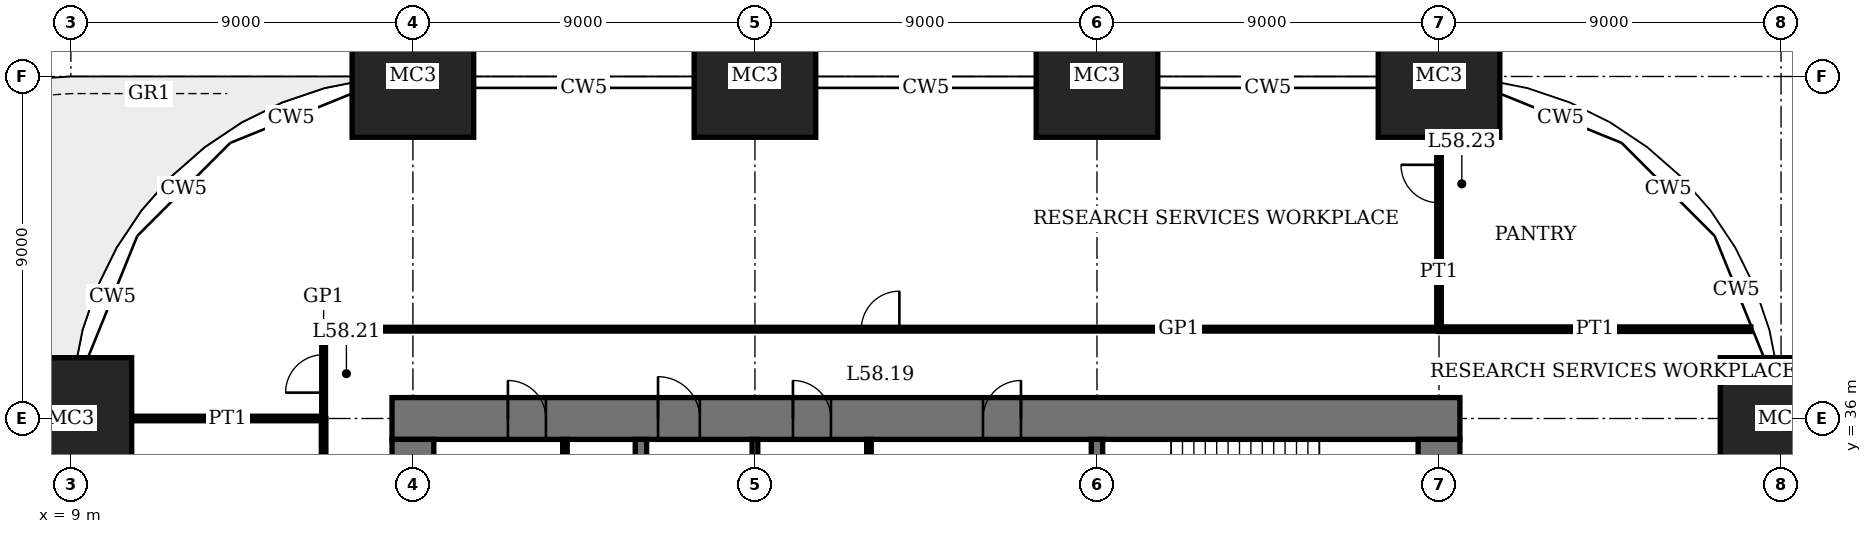
"""IFC4 building model, lengths in metres.
Left out: names, types, materials, properties, quantities, classifications, styles, units other than length and angle.
Written with IfcOpenShell. Run it as: python <this file> out.ifc"""

import sys

from ifc_helpers import new_model, si_unit, direction, frame, frame_2d, origin, origin_2d, place, context, subcontext, project, spatial, rectangle, extrude, element, fill, save


model = new_model("IFC4")
c1 = context("Model", 3, precision=1e-05, world=origin(), true_north=direction((0.0, 1.0)))
c2 = subcontext(c1, "Body", "Model", "MODEL_VIEW")
j1 = project(units=[si_unit("LENGTHUNIT", "METRE"), si_unit("PLANEANGLEUNIT", "RADIAN")], contexts=[c1])
p1 = place(None, origin())
s1 = spatial("IfcSite", under=j1, at=p1, CompositionType="ELEMENT")
p2 = place(p1, origin())
s2 = spatial("IfcBuilding", under=s1, at=p2, CompositionType="ELEMENT")
p3 = place(p2, frame((0.0, 0.0, 239.4)))
s3 = spatial("IfcBuildingStorey", under=s2, at=p3, CompositionType="ELEMENT", Elevation=239.4)
for number, where, z_axis, x_axis in (
    (1, (9.0, 36.0, 0.0), (0.0, 0.0, 1.0), (1.0, 0.0, 0.0)),
    (2, (18.0, 45.0, 0.0), (0.0, 0.0, 1.0), (1.0, 0.0, 0.0)),
    (3, (27.0, 45.0, 0.0), (0.0, 0.0, 1.0), (1.0, 0.0, 0.0)),
    (4, (36.0, 45.0, 0.0), (0.0, 0.0, 1.0), (1.0, 0.0, 0.0)),
    (5, (45.0, 45.0, 0.0), (0.0, 0.0, 1.0), (1.0, 0.0, 0.0)),
    (6, (54.0, 36.0, 0.0), (0.0, 0.0, 1.0), (1.0, 0.0, 0.0)),
):
    element("IfcColumn", number, at=place(p3, frame(where, z_axis=z_axis, x_axis=x_axis)), inside=s3, PredefinedType="COLUMN", context=c2, shape_type="SweptSolid", body=[
        extrude(rectangle(XDim=3.2, YDim=3.2, at=origin_2d()), origin(), (0.0, 0.0, 1.0), 4.0),
    ])
p4 = place(p3, frame((45.55, 36.0, 0.0), z_axis=(0.0, 0.0, 1.0), x_axis=(-1.0, 0.0, 0.0)))
e7 = element("IfcWall", 7, at=p4, inside=s3, PredefinedType="SHEAR", context=c2, shape_type="SweptSolid", body=[
    extrude(rectangle(XDim=28.1, YDim=1.1, at=frame_2d((14.05, 0.0))), origin(), (0.0, 0.0, 1.0), 4.0),
])
p5 = place(p4, frame((11.55, 0.0, 0.0)))
e8 = element("IfcOpeningElement", 8, at=p5, cuts=e7, PredefinedType="OPENING", context=c2, shape_type="SweptSolid", body=[
    extrude(rectangle(XDim=1.0, YDim=2.4, at=frame_2d((0.5, 1.2))), frame((0.0, 0.56, 0.0), z_axis=(0.0, -1.0, 0.0), x_axis=(1.0, 0.0, 0.0)), (0.0, 0.0, 1.0), 1.12),
])
p6 = place(p4, frame((16.55, 0.0, 0.0)))
e9 = element("IfcOpeningElement", 9, at=p6, cuts=e7, PredefinedType="OPENING", context=c2, shape_type="SweptSolid", body=[
    extrude(rectangle(XDim=1.0, YDim=2.4, at=frame_2d((0.5, 1.2))), frame((0.0, 0.56, 0.0), z_axis=(0.0, -1.0, 0.0), x_axis=(1.0, 0.0, 0.0)), (0.0, 0.0, 1.0), 1.12),
])
p7 = place(p4, frame((20.0, 0.0, 0.0)))
e10 = element("IfcOpeningElement", 10, at=p7, cuts=e7, PredefinedType="OPENING", context=c2, shape_type="SweptSolid", body=[
    extrude(rectangle(XDim=1.1, YDim=2.4, at=frame_2d((0.55, 1.2))), frame((0.0, 0.56, 0.0), z_axis=(0.0, -1.0, 0.0), x_axis=(1.0, 0.0, 0.0)), (0.0, 0.0, 1.0), 1.12),
])
p8 = place(p4, frame((24.05, 0.0, 0.0)))
e11 = element("IfcOpeningElement", 11, at=p8, cuts=e7, PredefinedType="OPENING", context=c2, shape_type="SweptSolid", body=[
    extrude(rectangle(XDim=1.0, YDim=2.4, at=frame_2d((0.5, 1.2))), frame((0.0, 0.56, 0.0), z_axis=(0.0, -1.0, 0.0), x_axis=(1.0, 0.0, 0.0)), (0.0, 0.0, 1.0), 1.12),
])
p9 = place(p3, frame((18.0, 35.45, 0.0), z_axis=(0.0, 0.0, 1.0), x_axis=(0.0, -1.0, 0.0)))
e12 = element("IfcWall", 12, at=p9, inside=s3, PredefinedType="SHEAR", context=c2, shape_type="SweptSolid", body=[
    extrude(rectangle(XDim=16.9, YDim=1.1, at=frame_2d((8.45, 0.0))), origin(), (0.0, 0.0, 1.0), 4.0),
])
p10 = place(p9, frame((8.9, 0.0, 0.0)))
e13 = element("IfcOpeningElement", 13, at=p10, cuts=e12, PredefinedType="OPENING", context=c2, shape_type="SweptSolid", body=[
    extrude(rectangle(XDim=1.8, YDim=2.4, at=frame_2d((0.9, 1.2))), frame((0.0, 0.56, 0.0), z_axis=(0.0, -1.0, 0.0), x_axis=(1.0, 0.0, 0.0)), (0.0, 0.0, 1.0), 1.12),
])
p11 = place(p3, frame((45.0, 18.55, 0.0), z_axis=(0.0, 0.0, 1.0), x_axis=(0.0, 1.0, 0.0)))
e14 = element("IfcWall", 14, at=p11, inside=s3, PredefinedType="SHEAR", context=c2, shape_type="SweptSolid", body=[
    extrude(rectangle(XDim=16.9, YDim=1.1, at=frame_2d((8.45, 0.0))), origin(), (0.0, 0.0, 1.0), 4.0),
])
p12 = place(p11, frame((8.9, 0.0, 0.0)))
e15 = element("IfcOpeningElement", 15, at=p12, cuts=e14, PredefinedType="OPENING", context=c2, shape_type="SweptSolid", body=[
    extrude(rectangle(XDim=1.8, YDim=2.4, at=frame_2d((0.9, 1.2))), frame((0.0, 0.56, 0.0), z_axis=(0.0, -1.0, 0.0), x_axis=(1.0, 0.0, 0.0)), (0.0, 0.0, 1.0), 1.12),
])
p13 = place(p3, frame((36.0, 32.4, 0.0), z_axis=(0.0, 0.0, 1.0), x_axis=(0.0, 1.0, 0.0)))
e16 = element("IfcWall", 16, at=p13, inside=s3, PredefinedType="SHEAR", context=c2, shape_type="SweptSolid", body=[
    extrude(rectangle(XDim=3.05, YDim=0.3, at=frame_2d((1.525, 0.0))), origin(), (0.0, 0.0, 1.0), 4.0),
])
p14 = place(p3, frame((24.0, 29.55, 0.0), z_axis=(0.0, 0.0, 1.0), x_axis=(0.0, 1.0, 0.0)))
e17 = element("IfcWall", 17, at=p14, inside=s3, PredefinedType="SHEAR", context=c2, shape_type="SweptSolid", body=[
    extrude(rectangle(XDim=5.9, YDim=0.3, at=frame_2d((2.95, 0.0))), origin(), (0.0, 0.0, 1.0), 4.0),
])
p15 = place(p3, frame((10.6, 36.0, 0.0), z_axis=(0.0, 0.0, 1.0), x_axis=(1.0, 0.0, 0.0)))
e18 = element("IfcWall", 18, at=p15, inside=s3, PredefinedType="PARTITIONING", context=c2, shape_type="SweptSolid", body=[
    extrude(rectangle(XDim=5.05, YDim=0.12, at=frame_2d((2.525, 0.0))), origin(), (0.0, 0.0, 1.0), 3.05),
])
p16 = place(p3, frame((45.0, 38.35, 0.0), z_axis=(0.0, 0.0, 1.0), x_axis=(1.0, 0.0, 0.0)))
e19 = element("IfcWall", 19, at=p16, inside=s3, PredefinedType="PARTITIONING", context=c2, shape_type="SweptSolid", body=[
    extrude(rectangle(XDim=8.206, YDim=0.12, at=frame_2d((4.103, 0.0))), origin(), (0.0, 0.0, 1.0), 3.75),
])
p17 = place(p3, frame((15.6, 38.35, 0.0), z_axis=(0.0, 0.0, 1.0), x_axis=(1.0, 0.0, 0.0)))
e20 = element("IfcWall", 20, at=p17, inside=s3, PredefinedType="PARTITIONING", context=c2, shape_type="SweptSolid", body=[
    extrude(rectangle(XDim=29.4, YDim=0.1, at=frame_2d((14.7, 0.0))), origin(), (0.0, 0.0, 1.0), 3.75),
])
p18 = place(p17, frame((14.2, 0.0, 0.0)))
e21 = element("IfcOpeningElement", 21, at=p18, cuts=e20, PredefinedType="OPENING", context=c2, shape_type="SweptSolid", body=[
    extrude(rectangle(XDim=1.0, YDim=2.4, at=frame_2d((0.5, 1.2))), frame((0.0, 0.06, 0.0), z_axis=(0.0, -1.0, 0.0), x_axis=(1.0, 0.0, 0.0)), (0.0, 0.0, 1.0), 0.12),
])
p19 = place(p3, frame((15.65, 27.0, 0.0), z_axis=(0.0, 0.0, 1.0), x_axis=(0.0, 1.0, 0.0)))
e22 = element("IfcWall", 22, at=p19, inside=s3, PredefinedType="PARTITIONING", context=c2, shape_type="SweptSolid", body=[
    extrude(rectangle(XDim=9.0, YDim=0.12, at=frame_2d((4.5, 0.0))), origin(), (0.0, 0.0, 1.0), 3.75),
])
p20 = place(p19, frame((3.6, 0.0, 0.0)))
e23 = element("IfcOpeningElement", 23, at=p20, cuts=e22, PredefinedType="OPENING", context=c2, shape_type="SweptSolid", body=[
    extrude(rectangle(XDim=1.8, YDim=2.4, at=frame_2d((0.9, 1.2))), frame((0.0, 0.07, 0.0), z_axis=(0.0, -1.0, 0.0), x_axis=(1.0, 0.0, 0.0)), (0.0, 0.0, 1.0), 0.14),
])
p21 = place(p3, frame((15.65, 36.01, 0.0), z_axis=(0.0, 0.0, 1.0), x_axis=(0.0, 1.0, 0.0)))
e24 = element("IfcWall", 24, at=p21, inside=s3, PredefinedType="PARTITIONING", context=c2, shape_type="SweptSolid", body=[
    extrude(rectangle(XDim=2.34, YDim=0.1, at=frame_2d((1.17, 0.0))), origin(), (0.0, 0.0, 1.0), 3.75),
])
p22 = place(p21, frame((0.67, 0.0, 0.0)))
e25 = element("IfcOpeningElement", 25, at=p22, cuts=e24, PredefinedType="OPENING", context=c2, shape_type="SweptSolid", body=[
    extrude(rectangle(XDim=1.0, YDim=2.4, at=frame_2d((0.5, 1.2))), frame((0.0, 0.06, 0.0), z_axis=(0.0, -1.0, 0.0), x_axis=(1.0, 0.0, 0.0)), (0.0, 0.0, 1.0), 0.12),
])
p23 = place(p3, frame((45.0, 38.35, 0.0), z_axis=(0.0, 0.0, 1.0), x_axis=(0.0, 1.0, 0.0)))
e26 = element("IfcWall", 26, at=p23, inside=s3, PredefinedType="PARTITIONING", context=c2, shape_type="SweptSolid", body=[
    extrude(rectangle(XDim=5.05, YDim=0.12, at=frame_2d((2.525, 0.0))), origin(), (0.0, 0.0, 1.0), 3.05),
])
p24 = place(p23, frame((3.325, 0.0, 0.0)))
e27 = element("IfcOpeningElement", 27, at=p24, cuts=e26, PredefinedType="OPENING", context=c2, shape_type="SweptSolid", body=[
    extrude(rectangle(XDim=1.0, YDim=2.4, at=frame_2d((0.5, 1.2))), frame((0.0, 0.07, 0.0), z_axis=(0.0, -1.0, 0.0), x_axis=(1.0, 0.0, 0.0)), (0.0, 0.0, 1.0), 0.14),
])
p25 = place(p3, frame((30.0, 32.55, 0.0), z_axis=(0.0, 0.0, 1.0), x_axis=(0.0, 1.0, 0.0)))
e28 = element("IfcWall", 28, at=p25, inside=s3, PredefinedType="PARTITIONING", context=c2, shape_type="SweptSolid", body=[
    extrude(rectangle(XDim=2.9, YDim=0.12, at=frame_2d((1.45, 0.0))), origin(), (0.0, 0.0, 1.0), 3.75),
])
p26 = place(p3, frame((27.0, 32.55, 0.0), z_axis=(0.0, 0.0, 1.0), x_axis=(0.0, 1.0, 0.0)))
e29 = element("IfcWall", 29, at=p26, inside=s3, PredefinedType="PARTITIONING", context=c2, shape_type="SweptSolid", body=[
    extrude(rectangle(XDim=2.9, YDim=0.15, at=frame_2d((1.45, 0.0))), origin(), (0.0, 0.0, 1.0), 3.75),
])
p27 = place(p3, frame((22.0, 32.55, 0.0), z_axis=(0.0, 0.0, 1.0), x_axis=(0.0, 1.0, 0.0)))
e30 = element("IfcWall", 30, at=p27, inside=s3, PredefinedType="PARTITIONING", context=c2, shape_type="SweptSolid", body=[
    extrude(rectangle(XDim=2.9, YDim=0.12, at=frame_2d((1.45, 0.0))), origin(), (0.0, 0.0, 1.0), 3.75),
])
p28 = place(p27, frame((0.95, 0.0, 0.0)))
e31 = element("IfcOpeningElement", 31, at=p28, cuts=e30, PredefinedType="OPENING", context=c2, shape_type="SweptSolid", body=[
    extrude(rectangle(XDim=1.0, YDim=2.4, at=frame_2d((0.5, 1.2))), frame((0.0, 0.07, 0.0), z_axis=(0.0, -1.0, 0.0), x_axis=(1.0, 0.0, 0.0)), (0.0, 0.0, 1.0), 0.14),
])
p29 = place(p5, origin())
e32 = element("IfcDoor", 32, at=p29, inside=s3, OperationType="SINGLE_SWING_LEFT", PredefinedType="DOOR", context=c2, shape_type="SweptSolid", body=[
    extrude(rectangle(XDim=1.0, YDim=2.4, at=frame_2d((0.5, 1.2))), frame((0.0, 0.025, 0.0), z_axis=(0.0, -1.0, 0.0), x_axis=(1.0, 0.0, 0.0)), (0.0, 0.0, 1.0), 0.05),
    extrude(rectangle(XDim=0.04, YDim=2.4, at=frame_2d((0.02, 1.2))), frame((0.0, 0.4, 0.0), z_axis=(0.0, -1.0, 0.0), x_axis=(1.0, 0.0, 0.0)), (0.0, 0.0, 1.0), 0.8),
    extrude(rectangle(XDim=0.04, YDim=2.4, at=frame_2d((0.98, 1.2))), frame((0.0, 0.4, 0.0), z_axis=(0.0, -1.0, 0.0), x_axis=(1.0, 0.0, 0.0)), (0.0, 0.0, 1.0), 0.8),
    extrude(rectangle(XDim=1.0, YDim=0.04, at=frame_2d((0.5, 2.38))), frame((0.0, 0.4, 0.0), z_axis=(0.0, -1.0, 0.0), x_axis=(1.0, 0.0, 0.0)), (0.0, 0.0, 1.0), 0.8),
])
fill(e8, e32)
p30 = place(p6, origin())
e33 = element("IfcDoor", 33, at=p30, inside=s3, OperationType="SINGLE_SWING_RIGHT", PredefinedType="DOOR", context=c2, shape_type="SweptSolid", body=[
    extrude(rectangle(XDim=1.0, YDim=2.4, at=frame_2d((0.5, 1.2))), frame((0.0, 0.025, 0.0), z_axis=(0.0, -1.0, 0.0), x_axis=(1.0, 0.0, 0.0)), (0.0, 0.0, 1.0), 0.05),
    extrude(rectangle(XDim=0.04, YDim=2.4, at=frame_2d((0.02, 1.2))), frame((0.0, 0.4, 0.0), z_axis=(0.0, -1.0, 0.0), x_axis=(1.0, 0.0, 0.0)), (0.0, 0.0, 1.0), 0.8),
    extrude(rectangle(XDim=0.04, YDim=2.4, at=frame_2d((0.98, 1.2))), frame((0.0, 0.4, 0.0), z_axis=(0.0, -1.0, 0.0), x_axis=(1.0, 0.0, 0.0)), (0.0, 0.0, 1.0), 0.8),
    extrude(rectangle(XDim=1.0, YDim=0.04, at=frame_2d((0.5, 2.38))), frame((0.0, 0.4, 0.0), z_axis=(0.0, -1.0, 0.0), x_axis=(1.0, 0.0, 0.0)), (0.0, 0.0, 1.0), 0.8),
])
fill(e9, e33)
p31 = place(p7, origin())
e34 = element("IfcDoor", 34, at=p31, inside=s3, OperationType="SINGLE_SWING_RIGHT", PredefinedType="DOOR", context=c2, shape_type="SweptSolid", body=[
    extrude(rectangle(XDim=1.1, YDim=2.4, at=frame_2d((0.55, 1.2))), frame((0.0, 0.025, 0.0), z_axis=(0.0, -1.0, 0.0), x_axis=(1.0, 0.0, 0.0)), (0.0, 0.0, 1.0), 0.05),
    extrude(rectangle(XDim=0.04, YDim=2.4, at=frame_2d((0.02, 1.2))), frame((0.0, 0.44, 0.0), z_axis=(0.0, -1.0, 0.0), x_axis=(1.0, 0.0, 0.0)), (0.0, 0.0, 1.0), 0.88),
    extrude(rectangle(XDim=0.04, YDim=2.4, at=frame_2d((1.08, 1.2))), frame((0.0, 0.44, 0.0), z_axis=(0.0, -1.0, 0.0), x_axis=(1.0, 0.0, 0.0)), (0.0, 0.0, 1.0), 0.88),
    extrude(rectangle(XDim=1.1, YDim=0.04, at=frame_2d((0.55, 2.38))), frame((0.0, 0.44, 0.0), z_axis=(0.0, -1.0, 0.0), x_axis=(1.0, 0.0, 0.0)), (0.0, 0.0, 1.0), 0.88),
])
fill(e10, e34)
p32 = place(p8, origin())
e35 = element("IfcDoor", 35, at=p32, inside=s3, OperationType="SINGLE_SWING_RIGHT", PredefinedType="DOOR", context=c2, shape_type="SweptSolid", body=[
    extrude(rectangle(XDim=1.0, YDim=2.4, at=frame_2d((0.5, 1.2))), frame((0.0, 0.025, 0.0), z_axis=(0.0, -1.0, 0.0), x_axis=(1.0, 0.0, 0.0)), (0.0, 0.0, 1.0), 0.05),
    extrude(rectangle(XDim=0.04, YDim=2.4, at=frame_2d((0.02, 1.2))), frame((0.0, 0.4, 0.0), z_axis=(0.0, -1.0, 0.0), x_axis=(1.0, 0.0, 0.0)), (0.0, 0.0, 1.0), 0.8),
    extrude(rectangle(XDim=0.04, YDim=2.4, at=frame_2d((0.98, 1.2))), frame((0.0, 0.4, 0.0), z_axis=(0.0, -1.0, 0.0), x_axis=(1.0, 0.0, 0.0)), (0.0, 0.0, 1.0), 0.8),
    extrude(rectangle(XDim=1.0, YDim=0.04, at=frame_2d((0.5, 2.38))), frame((0.0, 0.4, 0.0), z_axis=(0.0, -1.0, 0.0), x_axis=(1.0, 0.0, 0.0)), (0.0, 0.0, 1.0), 0.8),
])
fill(e11, e35)
p33 = place(p18, origin())
e36 = element("IfcDoor", 36, at=p33, inside=s3, OperationType="SINGLE_SWING_LEFT", PredefinedType="DOOR", context=c2, shape_type="SweptSolid", body=[
    extrude(rectangle(XDim=1.0, YDim=2.4, at=frame_2d((0.5, 1.2))), frame((0.0, 0.02, 0.0), z_axis=(0.0, -1.0, 0.0), x_axis=(1.0, 0.0, 0.0)), (0.0, 0.0, 1.0), 0.04),
])
fill(e21, e36)
p34 = place(p22, origin())
e37 = element("IfcDoor", 37, at=p34, inside=s3, OperationType="SINGLE_SWING_RIGHT", PredefinedType="DOOR", context=c2, shape_type="SweptSolid", body=[
    extrude(rectangle(XDim=1.0, YDim=2.4, at=frame_2d((0.5, 1.2))), frame((0.0, 0.02, 0.0), z_axis=(0.0, -1.0, 0.0), x_axis=(1.0, 0.0, 0.0)), (0.0, 0.0, 1.0), 0.04),
])
fill(e25, e37)
p35 = place(p24, origin())
e38 = element("IfcDoor", 38, at=p35, inside=s3, OperationType="SINGLE_SWING_LEFT", PredefinedType="DOOR", context=c2, shape_type="SweptSolid", body=[
    extrude(rectangle(XDim=1.0, YDim=2.4, at=frame_2d((0.5, 1.2))), frame((0.0, 0.025, 0.0), z_axis=(0.0, -1.0, 0.0), x_axis=(1.0, 0.0, 0.0)), (0.0, 0.0, 1.0), 0.05),
])
fill(e27, e38)
save(model, sys.argv[1])
